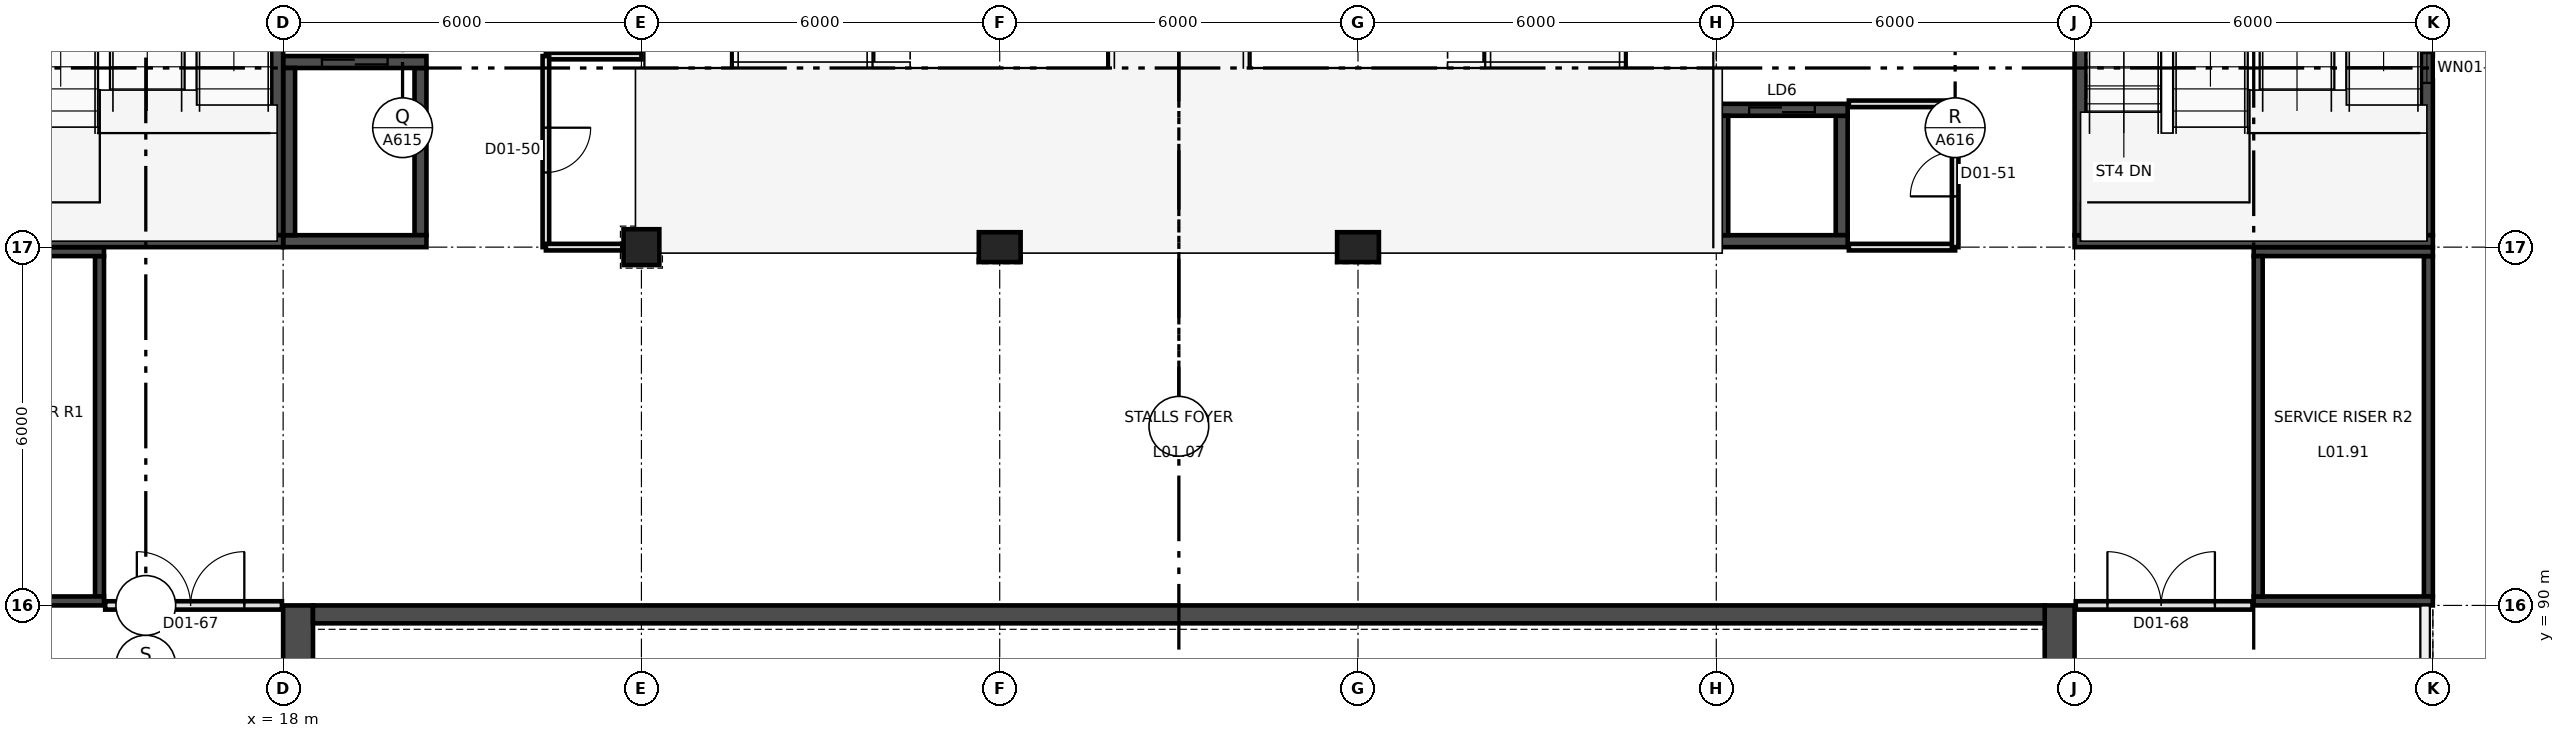
"""IFC4 building model, lengths in metres.
Left out: names, types, materials, properties, quantities, classifications, styles, units other than length and angle.
Written with IfcOpenShell. Run it as: python <this file> out.ifc"""

import sys

from ifc_helpers import new_model, si_unit, direction, frame, frame_2d, origin, origin_2d, place, context, subcontext, project, spatial, rectangle, extrude, element, fill, save


model = new_model("IFC4")
c1 = context("Model", 3, precision=1e-05, world=origin(), true_north=direction((0.0, 1.0)))
c2 = subcontext(c1, "Body", "Model", "MODEL_VIEW")
j1 = project(units=[si_unit("LENGTHUNIT", "METRE"), si_unit("PLANEANGLEUNIT", "RADIAN")], contexts=[c1])
p1 = place(None, origin())
s1 = spatial("IfcSite", under=j1, at=p1, CompositionType="ELEMENT")
p2 = place(p1, origin())
s2 = spatial("IfcBuilding", under=s1, at=p2, CompositionType="ELEMENT")
p3 = place(p2, frame((0.0, 0.0, 7.0)))
s3 = spatial("IfcBuildingStorey", under=s2, at=p3, CompositionType="ELEMENT", Elevation=7.0)
p4 = place(p3, frame((24.0, 96.0, 0.0), z_axis=(0.0, 0.0, 1.0), x_axis=(1.0, 0.0, 0.0)))
e1 = element("IfcColumn", 1, at=p4, inside=s3, PredefinedType="COLUMN", context=c2, shape_type="SweptSolid", body=[
    extrude(rectangle(XDim=0.6, YDim=0.6, at=origin_2d()), origin(), (0.0, 0.0, 1.0), 5.0),
])
for number, where, z_axis, x_axis in (
    (2, (30.0, 96.0, 0.0), (0.0, 0.0, 1.0), (1.0, 0.0, 0.0)),
    (3, (36.0, 96.0, 0.0), (0.0, 0.0, 1.0), (1.0, 0.0, 0.0)),
):
    element("IfcColumn", number, at=place(p3, frame(where, z_axis=z_axis, x_axis=x_axis)), inside=s3, PredefinedType="COLUMN", context=c2, shape_type="SweptSolid", body=[
        extrude(rectangle(XDim=0.7, YDim=0.5, at=origin_2d()), origin(), (0.0, 0.0, 1.0), 5.0),
    ])
p5 = place(p3, frame((12.0, 96.1, 0.0), z_axis=(0.0, 0.0, 1.0), x_axis=(1.0, 0.0, 0.0)))
e4 = element("IfcWall", 4, at=p5, inside=s3, PredefinedType="SHEAR", context=c2, shape_type="SweptSolid", body=[
    extrude(rectangle(XDim=6.0, YDim=0.2, at=frame_2d((3.0, 0.0))), origin(), (0.0, 0.0, 1.0), 5.0),
])
p6 = place(p3, frame((17.9, 96.2, 0.0), z_axis=(0.0, 0.0, 1.0), x_axis=(0.0, 1.0, 0.0)))
e5 = element("IfcWall", 5, at=p6, inside=s3, PredefinedType="SHEAR", context=c2, shape_type="SweptSolid", body=[
    extrude(rectangle(XDim=5.6, YDim=0.2, at=frame_2d((2.8, 0.0))), origin(), (0.0, 0.0, 1.0), 5.0),
])
p7 = place(p3, frame((48.0, 96.1, 0.0), z_axis=(0.0, 0.0, 1.0), x_axis=(1.0, 0.0, 0.0)))
e6 = element("IfcWall", 6, at=p7, inside=s3, PredefinedType="SHEAR", context=c2, shape_type="SweptSolid", body=[
    extrude(rectangle(XDim=6.0, YDim=0.2, at=frame_2d((3.0, 0.0))), origin(), (0.0, 0.0, 1.0), 5.0),
])
p8 = place(p3, frame((48.1, 96.2, 0.0), z_axis=(0.0, 0.0, 1.0), x_axis=(0.0, 1.0, 0.0)))
e7 = element("IfcWall", 7, at=p8, inside=s3, PredefinedType="SHEAR", context=c2, shape_type="SweptSolid", body=[
    extrude(rectangle(XDim=5.6, YDim=0.2, at=frame_2d((2.8, 0.0))), origin(), (0.0, 0.0, 1.0), 5.0),
])
p9 = place(p8, frame((4.4, 0.0, 0.0)))
e8 = element("IfcOpeningElement", 8, at=p9, cuts=e7, PredefinedType="OPENING", context=c2, shape_type="SweptSolid", body=[
    extrude(rectangle(XDim=1.1, YDim=2.2, at=frame_2d((0.55, 1.1))), frame((0.0, 0.11, 0.0), z_axis=(0.0, -1.0, 0.0), x_axis=(1.0, 0.0, 0.0)), (0.0, 0.0, 1.0), 0.22),
])
p10 = place(p3, frame((53.9, 96.2, 0.0), z_axis=(0.0, 0.0, 1.0), x_axis=(0.0, 1.0, 0.0)))
e9 = element("IfcWall", 9, at=p10, inside=s3, PredefinedType="SHEAR", context=c2, shape_type="SweptSolid", body=[
    extrude(rectangle(XDim=5.6, YDim=0.2, at=frame_2d((2.8, 0.0))), origin(), (0.0, 0.0, 1.0), 5.0),
])
p11 = place(p10, frame((2.55, 0.0, 0.9)))
e10 = element("IfcOpeningElement", 10, at=p11, cuts=e9, PredefinedType="OPENING", context=c2, shape_type="SweptSolid", body=[
    extrude(rectangle(XDim=0.5, YDim=2.1, at=frame_2d((0.25, 1.05))), frame((0.0, 0.11, 0.0), z_axis=(0.0, -1.0, 0.0), x_axis=(1.0, 0.0, 0.0)), (0.0, 0.0, 1.0), 0.22),
])
p12 = place(p3, frame((18.0, 99.1, 0.0), z_axis=(0.0, 0.0, 1.0), x_axis=(1.0, 0.0, 0.0)))
e11 = element("IfcWall", 11, at=p12, inside=s3, PredefinedType="SHEAR", context=c2, shape_type="SweptSolid", body=[
    extrude(rectangle(XDim=2.4, YDim=0.2, at=frame_2d((1.2, 0.0))), origin(), (0.0, 0.0, 1.0), 5.0),
])
p13 = place(p12, frame((0.65, 0.0, 0.0)))
e12 = element("IfcOpeningElement", 12, at=p13, cuts=e11, PredefinedType="OPENING", context=c2, shape_type="SweptSolid", body=[
    extrude(rectangle(XDim=1.1, YDim=2.1, at=frame_2d((0.55, 1.05))), frame((0.0, 0.11, 0.0), z_axis=(0.0, -1.0, 0.0), x_axis=(1.0, 0.0, 0.0)), (0.0, 0.0, 1.0), 0.22),
])
p14 = place(p3, frame((18.0, 96.1, 0.0), z_axis=(0.0, 0.0, 1.0), x_axis=(1.0, 0.0, 0.0)))
e13 = element("IfcWall", 13, at=p14, inside=s3, PredefinedType="SHEAR", context=c2, shape_type="SweptSolid", body=[
    extrude(rectangle(XDim=2.4, YDim=0.2, at=frame_2d((1.2, 0.0))), origin(), (0.0, 0.0, 1.0), 5.0),
])
for number, where, z_axis, x_axis in (
    (14, (18.1, 96.2, 0.0), (0.0, 0.0, 1.0), (0.0, 1.0, 0.0)),
    (15, (20.3, 96.2, 0.0), (0.0, 0.0, 1.0), (0.0, 1.0, 0.0)),
):
    element("IfcWall", number, at=place(p3, frame(where, z_axis=z_axis, x_axis=x_axis)), inside=s3, PredefinedType="SHEAR", context=c2, shape_type="SweptSolid", body=[
        extrude(rectangle(XDim=2.8, YDim=0.2, at=frame_2d((1.4, 0.0))), origin(), (0.0, 0.0, 1.0), 5.0),
    ])
p15 = place(p3, frame((42.0, 98.3, 0.0), z_axis=(0.0, 0.0, 1.0), x_axis=(1.0, 0.0, 0.0)))
e16 = element("IfcWall", 16, at=p15, inside=s3, PredefinedType="SHEAR", context=c2, shape_type="SweptSolid", body=[
    extrude(rectangle(XDim=2.2, YDim=0.2, at=frame_2d((1.1, 0.0))), origin(), (0.0, 0.0, 1.0), 5.0),
])
p16 = place(p15, frame((0.55, 0.0, 0.0)))
e17 = element("IfcOpeningElement", 17, at=p16, cuts=e16, PredefinedType="OPENING", context=c2, shape_type="SweptSolid", body=[
    extrude(rectangle(XDim=1.1, YDim=2.1, at=frame_2d((0.55, 1.05))), frame((0.0, 0.11, 0.0), z_axis=(0.0, -1.0, 0.0), x_axis=(1.0, 0.0, 0.0)), (0.0, 0.0, 1.0), 0.22),
])
p17 = place(p3, frame((42.0, 96.1, 0.0), z_axis=(0.0, 0.0, 1.0), x_axis=(1.0, 0.0, 0.0)))
e18 = element("IfcWall", 18, at=p17, inside=s3, PredefinedType="SHEAR", context=c2, shape_type="SweptSolid", body=[
    extrude(rectangle(XDim=2.2, YDim=0.2, at=frame_2d((1.1, 0.0))), origin(), (0.0, 0.0, 1.0), 5.0),
])
for number, where, z_axis, x_axis in (
    (19, (42.1, 96.2, 0.0), (0.0, 0.0, 1.0), (0.0, 1.0, 0.0)),
    (20, (44.1, 96.2, 0.0), (0.0, 0.0, 1.0), (0.0, 1.0, 0.0)),
):
    element("IfcWall", number, at=place(p3, frame(where, z_axis=z_axis, x_axis=x_axis)), inside=s3, PredefinedType="SHEAR", context=c2, shape_type="SweptSolid", body=[
        extrude(rectangle(XDim=2.0, YDim=0.2, at=frame_2d((1.0, 0.0))), origin(), (0.0, 0.0, 1.0), 5.0),
    ])
for number, where, z_axis, x_axis in (
    (21, (12.0, 95.925, 0.0), (0.0, 0.0, 1.0), (1.0, 0.0, 0.0)),
    (22, (12.0, 90.075, 0.0), (0.0, 0.0, 1.0), (1.0, 0.0, 0.0)),
):
    element("IfcWall", number, at=place(p3, frame(where, z_axis=z_axis, x_axis=x_axis)), inside=s3, PredefinedType="SHEAR", context=c2, shape_type="SweptSolid", body=[
        extrude(rectangle(XDim=3.0, YDim=0.15, at=frame_2d((1.5, 0.0))), origin(), (0.0, 0.0, 1.0), 5.0),
    ])
p18 = place(p3, frame((14.925, 90.15, 0.0), z_axis=(0.0, 0.0, 1.0), x_axis=(0.0, 1.0, 0.0)))
e23 = element("IfcWall", 23, at=p18, inside=s3, PredefinedType="SHEAR", context=c2, shape_type="SweptSolid", body=[
    extrude(rectangle(XDim=5.7, YDim=0.15, at=frame_2d((2.85, 0.0))), origin(), (0.0, 0.0, 1.0), 5.0),
])
for number, where, z_axis, x_axis in (
    (24, (51.0, 95.925, 0.0), (0.0, 0.0, 1.0), (1.0, 0.0, 0.0)),
    (25, (51.0, 90.075, 0.0), (0.0, 0.0, 1.0), (1.0, 0.0, 0.0)),
):
    element("IfcWall", number, at=place(p3, frame(where, z_axis=z_axis, x_axis=x_axis)), inside=s3, PredefinedType="SHEAR", context=c2, shape_type="SweptSolid", body=[
        extrude(rectangle(XDim=3.0, YDim=0.15, at=frame_2d((1.5, 0.0))), origin(), (0.0, 0.0, 1.0), 5.0),
    ])
for number, where, z_axis, x_axis in (
    (26, (51.075, 90.15, 0.0), (0.0, 0.0, 1.0), (0.0, 1.0, 0.0)),
    (27, (53.925, 90.15, 0.0), (0.0, 0.0, 1.0), (0.0, 1.0, 0.0)),
):
    element("IfcWall", number, at=place(p3, frame(where, z_axis=z_axis, x_axis=x_axis)), inside=s3, PredefinedType="SHEAR", context=c2, shape_type="SweptSolid", body=[
        extrude(rectangle(XDim=5.7, YDim=0.15, at=frame_2d((2.85, 0.0))), origin(), (0.0, 0.0, 1.0), 5.0),
    ])
p19 = place(p3, frame((18.25, 54.5, 0.0), z_axis=(0.0, 0.0, 1.0), x_axis=(0.0, 1.0, 0.0)))
e28 = element("IfcWall", 28, at=p19, inside=s3, PredefinedType="SHEAR", context=c2, shape_type="SweptSolid", body=[
    extrude(rectangle(XDim=35.5, YDim=0.5, at=frame_2d((17.75, 0.0))), origin(), (0.0, 0.0, 1.0), 5.0),
])
p20 = place(p19, frame((18.2, 0.0, 0.0)))
e29 = element("IfcOpeningElement", 29, at=p20, cuts=e28, PredefinedType="OPENING", context=c2, shape_type="SweptSolid", body=[
    extrude(rectangle(XDim=1.8, YDim=2.4, at=frame_2d((0.9, 1.2))), frame((0.0, 0.26, 0.0), z_axis=(0.0, -1.0, 0.0), x_axis=(1.0, 0.0, 0.0)), (0.0, 0.0, 1.0), 0.52),
])
p21 = place(p19, frame((21.0, 0.0, 0.0)))
e30 = element("IfcOpeningElement", 30, at=p21, cuts=e28, PredefinedType="OPENING", context=c2, shape_type="SweptSolid", body=[
    extrude(rectangle(XDim=1.8, YDim=2.4, at=frame_2d((0.9, 1.2))), frame((0.0, 0.26, 0.0), z_axis=(0.0, -1.0, 0.0), x_axis=(1.0, 0.0, 0.0)), (0.0, 0.0, 1.0), 0.52),
])
p22 = place(p3, frame((47.75, 54.5, 0.0), z_axis=(0.0, 0.0, 1.0), x_axis=(0.0, 1.0, 0.0)))
e31 = element("IfcWall", 31, at=p22, inside=s3, PredefinedType="SHEAR", context=c2, shape_type="SweptSolid", body=[
    extrude(rectangle(XDim=35.5, YDim=0.5, at=frame_2d((17.75, 0.0))), origin(), (0.0, 0.0, 1.0), 5.0),
])
p23 = place(p22, frame((18.2, 0.0, 0.0)))
e32 = element("IfcOpeningElement", 32, at=p23, cuts=e31, PredefinedType="OPENING", context=c2, shape_type="SweptSolid", body=[
    extrude(rectangle(XDim=1.8, YDim=2.4, at=frame_2d((0.9, 1.2))), frame((0.0, 0.26, 0.0), z_axis=(0.0, -1.0, 0.0), x_axis=(1.0, 0.0, 0.0)), (0.0, 0.0, 1.0), 0.52),
])
p24 = place(p22, frame((21.0, 0.0, 0.0)))
e33 = element("IfcOpeningElement", 33, at=p24, cuts=e31, PredefinedType="OPENING", context=c2, shape_type="SweptSolid", body=[
    extrude(rectangle(XDim=1.8, YDim=2.4, at=frame_2d((0.9, 1.2))), frame((0.0, 0.26, 0.0), z_axis=(0.0, -1.0, 0.0), x_axis=(1.0, 0.0, 0.0)), (0.0, 0.0, 1.0), 0.52),
])
p25 = place(p3, frame((18.5, 89.85, 0.0), z_axis=(0.0, 0.0, 1.0), x_axis=(1.0, 0.0, 0.0)))
e34 = element("IfcWall", 34, at=p25, inside=s3, PredefinedType="SHEAR", context=c2, shape_type="SweptSolid", body=[
    extrude(rectangle(XDim=29.0, YDim=0.3, at=frame_2d((14.5, 0.0))), origin(), (0.0, 0.0, 1.0), 5.0),
])
p26 = place(p3, frame((22.4, 99.2, 0.0), z_axis=(0.0, 0.0, 1.0), x_axis=(1.0, 0.0, 0.0)))
e35 = element("IfcWall", 35, at=p26, inside=s3, PredefinedType="PARTITIONING", context=c2, shape_type="SweptSolid", body=[
    extrude(rectangle(XDim=1.6, YDim=0.11, at=frame_2d((0.8, 0.0))), origin(), (0.0, 0.0, 1.0), 4.1),
])
p27 = place(p3, frame((22.4, 96.0, 0.0), z_axis=(0.0, 0.0, 1.0), x_axis=(0.0, 1.0, 0.0)))
e36 = element("IfcWall", 36, at=p27, inside=s3, PredefinedType="PARTITIONING", context=c2, shape_type="SweptSolid", body=[
    extrude(rectangle(XDim=3.2, YDim=0.11, at=frame_2d((1.6, 0.0))), origin(), (0.0, 0.0, 1.0), 4.15),
])
p28 = place(p27, frame((1.25, 0.0, 0.0)))
e37 = element("IfcOpeningElement", 37, at=p28, cuts=e36, PredefinedType="OPENING", context=c2, shape_type="SweptSolid", body=[
    extrude(rectangle(XDim=0.75, YDim=2.04, at=frame_2d((0.375, 1.02))), frame((0.0, 0.065, 0.0), z_axis=(0.0, -1.0, 0.0), x_axis=(1.0, 0.0, 0.0)), (0.0, 0.0, 1.0), 0.13),
])
p29 = place(p3, frame((22.4, 96.0, 0.0), z_axis=(0.0, 0.0, 1.0), x_axis=(1.0, 0.0, 0.0)))
e38 = element("IfcWall", 38, at=p29, inside=s3, PredefinedType="PARTITIONING", context=c2, shape_type="SweptSolid", body=[
    extrude(rectangle(XDim=1.28, YDim=0.11, at=frame_2d((0.64, 0.0))), origin(), (0.0, 0.0, 1.0), 4.15),
])
p30 = place(p3, frame((44.22, 96.0, 0.0), z_axis=(0.0, 0.0, 1.0), x_axis=(1.0, 0.0, 0.0)))
e39 = element("IfcWall", 39, at=p30, inside=s3, PredefinedType="PARTITIONING", context=c2, shape_type="SweptSolid", body=[
    extrude(rectangle(XDim=1.78, YDim=0.11, at=frame_2d((0.89, 0.0))), origin(), (0.0, 0.0, 1.0), 4.15),
])
p31 = place(p3, frame((46.0, 96.0, 0.0), z_axis=(0.0, 0.0, 1.0), x_axis=(0.0, 1.0, 0.0)))
e40 = element("IfcWall", 40, at=p31, inside=s3, PredefinedType="PARTITIONING", context=c2, shape_type="SweptSolid", body=[
    extrude(rectangle(XDim=2.4, YDim=0.11, at=frame_2d((1.2, 0.0))), origin(), (0.0, 0.0, 1.0), 4.15),
])
p32 = place(p31, frame((0.85, 0.0, 0.0)))
e41 = element("IfcOpeningElement", 41, at=p32, cuts=e40, PredefinedType="OPENING", context=c2, shape_type="SweptSolid", body=[
    extrude(rectangle(XDim=0.75, YDim=2.04, at=frame_2d((0.375, 1.02))), frame((0.0, 0.065, 0.0), z_axis=(0.0, -1.0, 0.0), x_axis=(1.0, 0.0, 0.0)), (0.0, 0.0, 1.0), 0.13),
])
p33 = place(p3, frame((44.22, 98.4, 0.0), z_axis=(0.0, 0.0, 1.0), x_axis=(1.0, 0.0, 0.0)))
e42 = element("IfcWall", 42, at=p33, inside=s3, PredefinedType="PARTITIONING", context=c2, shape_type="SweptSolid", body=[
    extrude(rectangle(XDim=1.78, YDim=0.11, at=frame_2d((0.89, 0.0))), origin(), (0.0, 0.0, 1.0), 4.75),
])
p34 = place(p3, frame((15.02, 90.0, 0.0), z_axis=(0.0, 0.0, 1.0), x_axis=(1.0, 0.0, 0.0)))
e43 = element("IfcWall", 43, at=p34, inside=s3, PredefinedType="PARTITIONING", context=c2, shape_type="SweptSolid", body=[
    extrude(rectangle(XDim=2.96, YDim=0.14, at=frame_2d((1.48, 0.0))), origin(), (0.0, 0.0, 1.0), 4.15),
])
p35 = place(p34, frame((0.53, 0.0, 0.0)))
e44 = element("IfcOpeningElement", 44, at=p35, cuts=e43, PredefinedType="OPENING", context=c2, shape_type="SweptSolid", body=[
    extrude(rectangle(XDim=1.8, YDim=2.1, at=frame_2d((0.9, 1.05))), frame((0.0, 0.08, 0.0), z_axis=(0.0, -1.0, 0.0), x_axis=(1.0, 0.0, 0.0)), (0.0, 0.0, 1.0), 0.16),
])
p36 = place(p3, frame((48.02, 90.0, 0.0), z_axis=(0.0, 0.0, 1.0), x_axis=(1.0, 0.0, 0.0)))
e45 = element("IfcWall", 45, at=p36, inside=s3, PredefinedType="PARTITIONING", context=c2, shape_type="SweptSolid", body=[
    extrude(rectangle(XDim=2.96, YDim=0.14, at=frame_2d((1.48, 0.0))), origin(), (0.0, 0.0, 1.0), 4.15),
])
p37 = place(p36, frame((0.53, 0.0, 0.0)))
e46 = element("IfcOpeningElement", 46, at=p37, cuts=e45, PredefinedType="OPENING", context=c2, shape_type="SweptSolid", body=[
    extrude(rectangle(XDim=1.8, YDim=2.1, at=frame_2d((0.9, 1.05))), frame((0.0, 0.08, 0.0), z_axis=(0.0, -1.0, 0.0), x_axis=(1.0, 0.0, 0.0)), (0.0, 0.0, 1.0), 0.16),
])
p38 = place(p11, origin())
e47 = element("IfcWindow", 47, at=p38, inside=s3, PartitioningType="SINGLE_PANEL", PredefinedType="WINDOW", context=c2, shape_type="SweptSolid", body=[
    extrude(rectangle(XDim=0.5, YDim=2.1, at=frame_2d((0.25, 1.05))), frame((0.0, 0.03, 0.0), z_axis=(0.0, -1.0, 0.0), x_axis=(1.0, 0.0, 0.0)), (0.0, 0.0, 1.0), 0.06),
])
fill(e10, e47)
p39 = place(p28, frame((0.75, 0.0, 0.0), z_axis=(0.0, 0.0, 1.0), x_axis=(-1.0, 0.0, 0.0)))
e48 = element("IfcDoor", 48, at=p39, inside=s3, OperationType="SINGLE_SWING_RIGHT", PredefinedType="DOOR", context=c2, shape_type="SweptSolid", body=[
    extrude(rectangle(XDim=0.75, YDim=2.04, at=frame_2d((0.375, 1.02))), frame((0.0, 0.025, 0.0), z_axis=(0.0, -1.0, 0.0), x_axis=(1.0, 0.0, 0.0)), (0.0, 0.0, 1.0), 0.05),
])
fill(e37, e48)
p40 = place(p32, origin())
e49 = element("IfcDoor", 49, at=p40, inside=s3, OperationType="SINGLE_SWING_LEFT", PredefinedType="DOOR", context=c2, shape_type="SweptSolid", body=[
    extrude(rectangle(XDim=0.75, YDim=2.04, at=frame_2d((0.375, 1.02))), frame((0.0, 0.025, 0.0), z_axis=(0.0, -1.0, 0.0), x_axis=(1.0, 0.0, 0.0)), (0.0, 0.0, 1.0), 0.05),
])
fill(e41, e49)
p41 = place(p35, frame((1.8, 0.0, 0.0), z_axis=(0.0, 0.0, 1.0), x_axis=(-1.0, 0.0, 0.0)))
e50 = element("IfcDoor", 50, at=p41, inside=s3, OperationType="DOUBLE_DOOR_SINGLE_SWING", PredefinedType="DOOR", context=c2, shape_type="SweptSolid", body=[
    extrude(rectangle(XDim=1.8, YDim=2.1, at=frame_2d((0.9, 1.05))), frame((0.0, 0.025, 0.0), z_axis=(0.0, -1.0, 0.0), x_axis=(1.0, 0.0, 0.0)), (0.0, 0.0, 1.0), 0.05),
])
fill(e44, e50)
p42 = place(p37, frame((1.8, 0.0, 0.0), z_axis=(0.0, 0.0, 1.0), x_axis=(-1.0, 0.0, 0.0)))
e51 = element("IfcDoor", 51, at=p42, inside=s3, OperationType="DOUBLE_DOOR_SINGLE_SWING", PredefinedType="DOOR", context=c2, shape_type="SweptSolid", body=[
    extrude(rectangle(XDim=1.8, YDim=2.1, at=frame_2d((0.9, 1.05))), frame((0.0, 0.025, 0.0), z_axis=(0.0, -1.0, 0.0), x_axis=(1.0, 0.0, 0.0)), (0.0, 0.0, 1.0), 0.05),
])
fill(e46, e51)
p43 = place(p13, origin())
e52 = element("IfcDoor", 52, at=p43, inside=s3, OperationType="DOUBLE_DOOR_SLIDING", PredefinedType="DOOR", context=c2, shape_type="SweptSolid", body=[
    extrude(rectangle(XDim=1.1, YDim=2.1, at=frame_2d((0.55, 1.05))), frame((0.0, 0.025, 0.0), z_axis=(0.0, -1.0, 0.0), x_axis=(1.0, 0.0, 0.0)), (0.0, 0.0, 1.0), 0.05),
])
fill(e12, e52)
p44 = place(p16, origin())
e53 = element("IfcDoor", 53, at=p44, inside=s3, OperationType="DOUBLE_DOOR_SLIDING", PredefinedType="DOOR", context=c2, shape_type="SweptSolid", body=[
    extrude(rectangle(XDim=1.1, YDim=2.1, at=frame_2d((0.55, 1.05))), frame((0.0, 0.025, 0.0), z_axis=(0.0, -1.0, 0.0), x_axis=(1.0, 0.0, 0.0)), (0.0, 0.0, 1.0), 0.05),
])
fill(e17, e53)
save(model, sys.argv[1])
